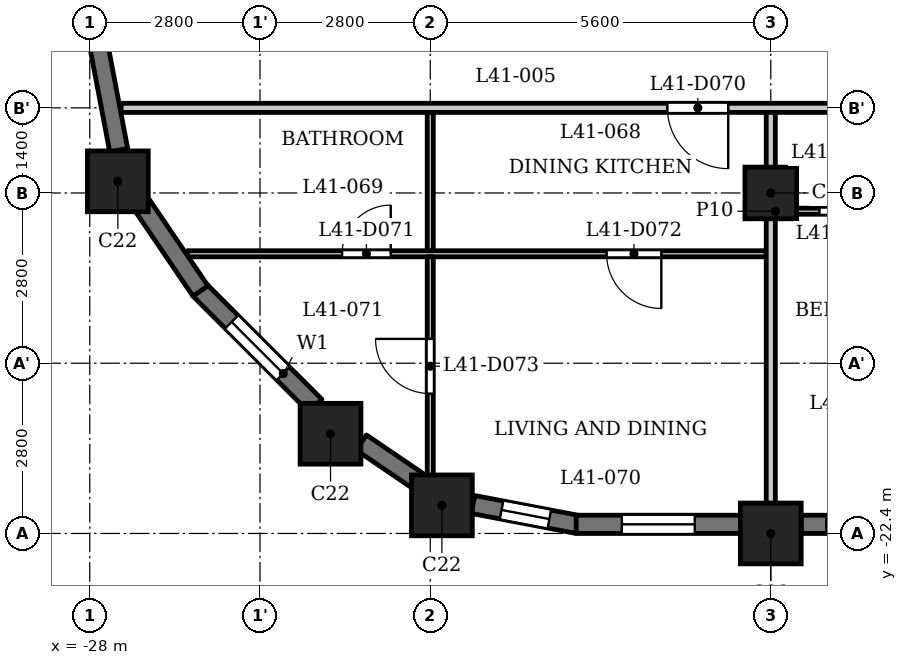
"""IFC4 building model, lengths in metres.
Left out: names, types, materials, properties, quantities, classifications, styles, units other than length and angle.
Written with IfcOpenShell. Run it as: python <this file> out.ifc"""

import sys

from ifc_helpers import new_model, si_unit, direction, frame, frame_2d, origin, origin_2d, place, context, subcontext, project, spatial, rectangle, extrude, element, fill, save


model = new_model("IFC4")
c1 = context("Model", 3, precision=1e-05, world=origin(), true_north=direction((0.0, 1.0)))
c2 = subcontext(c1, "Body", "Model", "MODEL_VIEW")
j1 = project(units=[si_unit("LENGTHUNIT", "METRE"), si_unit("PLANEANGLEUNIT", "RADIAN")], contexts=[c1])
p1 = place(None, origin())
s1 = spatial("IfcSite", under=j1, at=p1, CompositionType="ELEMENT")
p2 = place(p1, origin())
s2 = spatial("IfcBuilding", under=s1, at=p2, CompositionType="ELEMENT")
p3 = place(p2, frame((0.0, 0.0, 160.6)))
s3 = spatial("IfcBuildingStorey", under=s2, at=p3, CompositionType="ELEMENT", Elevation=160.6)
for number, where, z_axis, x_axis in (
    (1, (-22.209, -21.938, 0.0), (0.0, 0.0, 1.0), (1.0, 0.0, 0.0)),
    (2, (-16.8, -22.4, 0.0), (0.0, 0.0, 1.0), (1.0, 0.0, 0.0)),
    (3, (-27.538, -16.609, 0.0), (0.0, 0.0, 1.0), (1.0, 0.0, 0.0)),
    (4, (-24.04, -20.76, 0.0), (0.0, 0.0, 1.0), (1.0, 0.0, 0.0)),
):
    element("IfcColumn", number, at=place(p3, frame(where, z_axis=z_axis, x_axis=x_axis)), inside=s3, PredefinedType="COLUMN", context=c2, shape_type="SweptSolid", body=[
        extrude(rectangle(XDim=1.0, YDim=1.0, at=origin_2d()), origin(), (0.0, 0.0, 1.0), 3.5),
    ])
p4 = place(p3, frame((-16.8, -16.8, 0.0), z_axis=(0.0, 0.0, 1.0), x_axis=(1.0, 0.0, 0.0)))
e5 = element("IfcColumn", 5, at=p4, inside=s3, PredefinedType="COLUMN", context=c2, shape_type="SweptSolid", body=[
    extrude(rectangle(XDim=0.85, YDim=0.85, at=origin_2d()), origin(), (0.0, 0.0, 1.0), 3.5),
])
p5 = place(p3, frame((-26.197, -18.391, 0.0), z_axis=(0.0, 0.0, 1.0), x_axis=(0.707061571201, -0.707151988282, 0.0)))
e6 = element("IfcWall", 6, at=p5, inside=s3, PredefinedType="SOLIDWALL", context=c2, shape_type="SweptSolid", body=[
    extrude(rectangle(XDim=2.7, YDim=0.3, at=frame_2d((1.35, 0.0))), origin(), (0.0, 0.0, 1.0), 2.45),
])
p6 = place(p5, frame((0.75, 0.0, 0.6)))
e7 = element("IfcOpeningElement", 7, at=p6, cuts=e6, PredefinedType="OPENING", context=c2, shape_type="SweptSolid", body=[
    extrude(rectangle(XDim=1.2, YDim=1.55, at=frame_2d((0.6, 0.775))), frame((0.0, 0.16, 0.0), z_axis=(0.0, -1.0, 0.0), x_axis=(1.0, 0.0, 0.0)), (0.0, 0.0, 1.0), 0.32),
])
p7 = place(p3, frame((-23.534, -20.904, 0.0), z_axis=(0.0, 0.0, 1.0), x_axis=(0.827103906596, -0.56204904385, 0.0)))
e8 = element("IfcWall", 8, at=p7, inside=s3, PredefinedType="SOLIDWALL", context=c2, shape_type="SweptSolid", body=[
    extrude(rectangle(XDim=1.177, YDim=0.3, at=frame_2d((0.589, 0.0))), origin(), (0.0, 0.0, 1.0), 3.2),
])
p8 = place(p3, frame((-21.697, -21.924, 0.0), z_axis=(0.0, 0.0, 1.0), x_axis=(0.982284988433, -0.187393173565, 0.0)))
e9 = element("IfcWall", 9, at=p8, inside=s3, PredefinedType="SOLIDWALL", context=c2, shape_type="SweptSolid", body=[
    extrude(rectangle(XDim=1.756, YDim=0.3, at=frame_2d((0.878, 0.0))), origin(), (0.0, 0.0, 1.0), 2.45),
])
p9 = place(p8, frame((0.478, 0.0, 0.6)))
e10 = element("IfcOpeningElement", 10, at=p9, cuts=e9, PredefinedType="OPENING", context=c2, shape_type="SweptSolid", body=[
    extrude(rectangle(XDim=0.8, YDim=1.55, at=frame_2d((0.4, 0.775))), frame((0.0, 0.16, 0.0), z_axis=(0.0, -1.0, 0.0), x_axis=(1.0, 0.0, 0.0)), (0.0, 0.0, 1.0), 0.32),
])
p10 = place(p3, frame((-20.0, -22.25, 0.0), z_axis=(0.0, 0.0, 1.0), x_axis=(1.0, 0.0, 0.0)))
e11 = element("IfcWall", 11, at=p10, inside=s3, PredefinedType="SOLIDWALL", context=c2, shape_type="SweptSolid", body=[
    extrude(rectangle(XDim=2.7, YDim=0.3, at=frame_2d((1.35, 0.0))), origin(), (0.0, 0.0, 1.0), 2.45),
])
p11 = place(p10, frame((0.75, 0.0, 0.6)))
e12 = element("IfcOpeningElement", 12, at=p11, cuts=e11, PredefinedType="OPENING", context=c2, shape_type="SweptSolid", body=[
    extrude(rectangle(XDim=1.2, YDim=1.55, at=frame_2d((0.6, 0.775))), frame((0.0, 0.16, 0.0), z_axis=(0.0, -1.0, 0.0), x_axis=(1.0, 0.0, 0.0)), (0.0, 0.0, 1.0), 0.32),
])
p12 = place(p3, frame((-16.3, -22.25, 0.0), z_axis=(0.0, 0.0, 1.0), x_axis=(1.0, 0.0, 0.0)))
e13 = element("IfcWall", 13, at=p12, inside=s3, PredefinedType="SOLIDWALL", context=c2, shape_type="SweptSolid", body=[
    extrude(rectangle(XDim=4.6, YDim=0.3, at=frame_2d((2.3, 0.0))), origin(), (0.0, 0.0, 1.0), 2.45),
])
p13 = place(p12, frame((0.413, 0.0, 0.6)))
e14 = element("IfcOpeningElement", 14, at=p13, cuts=e13, PredefinedType="OPENING", context=c2, shape_type="SweptSolid", body=[
    extrude(rectangle(XDim=1.2, YDim=1.55, at=frame_2d((0.6, 0.775))), frame((0.0, 0.16, 0.0), z_axis=(0.0, -1.0, 0.0), x_axis=(1.0, 0.0, 0.0)), (0.0, 0.0, 1.0), 0.32),
])
p14 = place(p12, frame((2.488, 0.0, 0.9)))
e15 = element("IfcOpeningElement", 15, at=p14, cuts=e13, PredefinedType="OPENING", context=c2, shape_type="SweptSolid", body=[
    extrude(rectangle(XDim=1.8, YDim=1.25, at=frame_2d((0.9, 0.625))), frame((0.0, 0.16, 0.0), z_axis=(0.0, -1.0, 0.0), x_axis=(1.0, 0.0, 0.0)), (0.0, 0.0, 1.0), 0.32),
])
for number, where, z_axis, x_axis in (
    (16, (-27.853, -14.372, 0.0), (0.0, 0.0, 1.0), (0.187, -0.982, 0.0)),
    (17, (-27.166, -16.96, 0.0), (0.0, 0.0, 1.0), (0.562, -0.827, 0.0)),
):
    element("IfcWall", number, at=place(p3, frame(where, z_axis=z_axis, x_axis=x_axis)), inside=s3, PredefinedType="SOLIDWALL", context=c2, shape_type="SweptSolid", body=[
        extrude(rectangle(XDim=1.756, YDim=0.3, at=frame_2d((0.878, 0.0))), origin(), (0.0, 0.0, 1.0), 2.45),
    ])
p15 = place(p3, frame((-26.394, -17.8, 0.0), z_axis=(0.0, 0.0, 1.0), x_axis=(1.0, 0.0, 0.0)))
e18 = element("IfcWall", 18, at=p15, inside=s3, PredefinedType="PARTITIONING", context=c2, shape_type="SweptSolid", body=[
    extrude(rectangle(XDim=9.519, YDim=0.1, at=frame_2d((4.76, 0.0))), origin(), (0.0, 0.0, 1.0), 3.2),
])
p16 = place(p15, frame((2.544, 0.0, 0.0)))
e19 = element("IfcOpeningElement", 19, at=p16, cuts=e18, PredefinedType="OPENING", context=c2, shape_type="SweptSolid", body=[
    extrude(rectangle(XDim=0.8, YDim=2.1, at=frame_2d((0.4, 1.05))), frame((0.0, 0.06, 0.0), z_axis=(0.0, -1.0, 0.0), x_axis=(1.0, 0.0, 0.0)), (0.0, 0.0, 1.0), 0.12),
])
p17 = place(p15, frame((6.894, 0.0, 0.0)))
e20 = element("IfcOpeningElement", 20, at=p17, cuts=e18, PredefinedType="OPENING", context=c2, shape_type="SweptSolid", body=[
    extrude(rectangle(XDim=0.9, YDim=2.1, at=frame_2d((0.45, 1.05))), frame((0.0, 0.06, 0.0), z_axis=(0.0, -1.0, 0.0), x_axis=(1.0, 0.0, 0.0)), (0.0, 0.0, 1.0), 0.12),
])
p18 = place(p3, frame((-16.725, -17.1, 0.0), z_axis=(0.0, 0.0, 1.0), x_axis=(1.0, 0.0, 0.0)))
e21 = element("IfcWall", 21, at=p18, inside=s3, PredefinedType="PARTITIONING", context=c2, shape_type="SweptSolid", body=[
    extrude(rectangle(XDim=33.45, YDim=0.1, at=frame_2d((16.725, 0.0))), origin(), (0.0, 0.0, 1.0), 3.2),
])
p19 = place(p18, frame((0.725, 0.0, 0.0)))
e22 = element("IfcOpeningElement", 22, at=p19, cuts=e21, PredefinedType="OPENING", context=c2, shape_type="SweptSolid", body=[
    extrude(rectangle(XDim=0.8, YDim=2.1, at=frame_2d((0.4, 1.05))), frame((0.0, 0.06, 0.0), z_axis=(0.0, -1.0, 0.0), x_axis=(1.0, 0.0, 0.0)), (0.0, 0.0, 1.0), 0.12),
])
p20 = place(p18, frame((3.175, 0.0, 0.0)))
e23 = element("IfcOpeningElement", 23, at=p20, cuts=e21, PredefinedType="OPENING", context=c2, shape_type="SweptSolid", body=[
    extrude(rectangle(XDim=0.9, YDim=2.1, at=frame_2d((0.45, 1.05))), frame((0.0, 0.06, 0.0), z_axis=(0.0, -1.0, 0.0), x_axis=(1.0, 0.0, 0.0)), (0.0, 0.0, 1.0), 0.12),
])
p21 = place(p18, frame((6.075, 0.0, 0.0)))
e24 = element("IfcOpeningElement", 24, at=p21, cuts=e21, PredefinedType="OPENING", context=c2, shape_type="SweptSolid", body=[
    extrude(rectangle(XDim=0.8, YDim=2.1, at=frame_2d((0.4, 1.05))), frame((0.0, 0.06, 0.0), z_axis=(0.0, -1.0, 0.0), x_axis=(1.0, 0.0, 0.0)), (0.0, 0.0, 1.0), 0.12),
])
p22 = place(p18, frame((9.425, 0.0, 0.0)))
e25 = element("IfcOpeningElement", 25, at=p22, cuts=e21, PredefinedType="OPENING", context=c2, shape_type="SweptSolid", body=[
    extrude(rectangle(XDim=0.9, YDim=2.1, at=frame_2d((0.45, 1.05))), frame((0.0, 0.06, 0.0), z_axis=(0.0, -1.0, 0.0), x_axis=(1.0, 0.0, 0.0)), (0.0, 0.0, 1.0), 0.12),
])
p23 = place(p18, frame((12.675, 0.0, 0.0)))
e26 = element("IfcOpeningElement", 26, at=p23, cuts=e21, PredefinedType="OPENING", context=c2, shape_type="SweptSolid", body=[
    extrude(rectangle(XDim=0.8, YDim=2.1, at=frame_2d((0.4, 1.05))), frame((0.0, 0.06, 0.0), z_axis=(0.0, -1.0, 0.0), x_axis=(1.0, 0.0, 0.0)), (0.0, 0.0, 1.0), 0.12),
])
p24 = place(p18, frame((15.275, 0.0, 0.0)))
e27 = element("IfcOpeningElement", 27, at=p24, cuts=e21, PredefinedType="OPENING", context=c2, shape_type="SweptSolid", body=[
    extrude(rectangle(XDim=0.9, YDim=2.1, at=frame_2d((0.45, 1.05))), frame((0.0, 0.06, 0.0), z_axis=(0.0, -1.0, 0.0), x_axis=(1.0, 0.0, 0.0)), (0.0, 0.0, 1.0), 0.12),
])
p25 = place(p18, frame((20.625, 0.0, 0.0)))
e28 = element("IfcOpeningElement", 28, at=p25, cuts=e21, PredefinedType="OPENING", context=c2, shape_type="SweptSolid", body=[
    extrude(rectangle(XDim=0.8, YDim=2.1, at=frame_2d((0.4, 1.05))), frame((0.0, 0.06, 0.0), z_axis=(0.0, -1.0, 0.0), x_axis=(1.0, 0.0, 0.0)), (0.0, 0.0, 1.0), 0.12),
])
p26 = place(p18, frame((17.375, 0.0, 0.0)))
e29 = element("IfcOpeningElement", 29, at=p26, cuts=e21, PredefinedType="OPENING", context=c2, shape_type="SweptSolid", body=[
    extrude(rectangle(XDim=0.9, YDim=2.1, at=frame_2d((0.45, 1.05))), frame((0.0, 0.06, 0.0), z_axis=(0.0, -1.0, 0.0), x_axis=(1.0, 0.0, 0.0)), (0.0, 0.0, 1.0), 0.12),
])
p27 = place(p18, frame((31.075, 0.0, 0.0)))
e30 = element("IfcOpeningElement", 30, at=p27, cuts=e21, PredefinedType="OPENING", context=c2, shape_type="SweptSolid", body=[
    extrude(rectangle(XDim=0.8, YDim=2.1, at=frame_2d((0.4, 1.05))), frame((0.0, 0.06, 0.0), z_axis=(0.0, -1.0, 0.0), x_axis=(1.0, 0.0, 0.0)), (0.0, 0.0, 1.0), 0.12),
])
p28 = place(p18, frame((29.325, 0.0, 0.0)))
e31 = element("IfcOpeningElement", 31, at=p28, cuts=e21, PredefinedType="OPENING", context=c2, shape_type="SweptSolid", body=[
    extrude(rectangle(XDim=0.9, YDim=2.1, at=frame_2d((0.45, 1.05))), frame((0.0, 0.06, 0.0), z_axis=(0.0, -1.0, 0.0), x_axis=(1.0, 0.0, 0.0)), (0.0, 0.0, 1.0), 0.12),
])
p29 = place(p18, frame((23.725, 0.0, 0.0)))
e32 = element("IfcOpeningElement", 32, at=p29, cuts=e21, PredefinedType="OPENING", context=c2, shape_type="SweptSolid", body=[
    extrude(rectangle(XDim=0.9, YDim=2.1, at=frame_2d((0.45, 1.05))), frame((0.0, 0.06, 0.0), z_axis=(0.0, -1.0, 0.0), x_axis=(1.0, 0.0, 0.0)), (0.0, 0.0, 1.0), 0.12),
])
p30 = place(p18, frame((25.775, 0.0, 0.0)))
e33 = element("IfcOpeningElement", 33, at=p30, cuts=e21, PredefinedType="OPENING", context=c2, shape_type="SweptSolid", body=[
    extrude(rectangle(XDim=0.9, YDim=2.1, at=frame_2d((0.45, 1.05))), frame((0.0, 0.06, 0.0), z_axis=(0.0, -1.0, 0.0), x_axis=(1.0, 0.0, 0.0)), (0.0, 0.0, 1.0), 0.12),
])
p31 = place(p3, frame((-27.484, -15.4, 0.0), z_axis=(0.0, 0.0, 1.0), x_axis=(1.0, 0.0, 0.0)))
e34 = element("IfcWall", 34, at=p31, inside=s3, PredefinedType="PARTITIONING", context=c2, shape_type="SweptSolid", body=[
    extrude(rectangle(XDim=12.559, YDim=0.15, at=frame_2d((6.279, 0.0))), origin(), (0.0, 0.0, 1.0), 3.2),
])
p32 = place(p31, frame((8.984, 0.0, 0.0)))
e35 = element("IfcOpeningElement", 35, at=p32, cuts=e34, PredefinedType="OPENING", context=c2, shape_type="SweptSolid", body=[
    extrude(rectangle(XDim=1.0, YDim=2.1, at=frame_2d((0.5, 1.05))), frame((0.0, 0.085, 0.0), z_axis=(0.0, -1.0, 0.0), x_axis=(1.0, 0.0, 0.0)), (0.0, 0.0, 1.0), 0.17),
])
p33 = place(p3, frame((-22.4, -21.72, 0.0), z_axis=(0.0, 0.0, 1.0), x_axis=(0.0, 1.0, 0.0)))
e36 = element("IfcWall", 36, at=p33, inside=s3, PredefinedType="PARTITIONING", context=c2, shape_type="SweptSolid", body=[
    extrude(rectangle(XDim=3.87, YDim=0.1, at=frame_2d((1.935, 0.0))), origin(), (0.0, 0.0, 1.0), 3.2),
])
p34 = place(p33, frame((1.62, 0.0, 0.0)))
e37 = element("IfcOpeningElement", 37, at=p34, cuts=e36, PredefinedType="OPENING", context=c2, shape_type="SweptSolid", body=[
    extrude(rectangle(XDim=0.9, YDim=2.1, at=frame_2d((0.45, 1.05))), frame((0.0, 0.06, 0.0), z_axis=(0.0, -1.0, 0.0), x_axis=(1.0, 0.0, 0.0)), (0.0, 0.0, 1.0), 0.12),
])
p35 = place(p3, frame((-22.4, -17.75, 0.0), z_axis=(0.0, 0.0, 1.0), x_axis=(0.0, 1.0, 0.0)))
e38 = element("IfcWall", 38, at=p35, inside=s3, PredefinedType="PARTITIONING", context=c2, shape_type="SweptSolid", body=[
    extrude(rectangle(XDim=2.275, YDim=0.1, at=frame_2d((1.137, 0.0))), origin(), (0.0, 0.0, 1.0), 3.2),
])
p36 = place(p3, frame((-16.8, -22.88, 0.0), z_axis=(0.0, 0.0, 1.0), x_axis=(0.0, 1.0, 0.0)))
e39 = element("IfcWall", 39, at=p36, inside=s3, PredefinedType="PARTITIONING", context=c2, shape_type="SweptSolid", body=[
    extrude(rectangle(XDim=7.405, YDim=0.15, at=frame_2d((3.702, 0.0))), origin(), (0.0, 0.0, 1.0), 3.2),
])
p37 = place(p19, origin())
e40 = element("IfcDoor", 40, at=p37, inside=s3, OperationType="SINGLE_SWING_LEFT", PredefinedType="DOOR", context=c2, shape_type="SweptSolid", body=[
    extrude(rectangle(XDim=0.8, YDim=2.1, at=frame_2d((0.4, 1.05))), frame((0.0, 0.025, 0.0), z_axis=(0.0, -1.0, 0.0), x_axis=(1.0, 0.0, 0.0)), (0.0, 0.0, 1.0), 0.05),
])
fill(e22, e40)
p38 = place(p32, origin())
e41 = element("IfcDoor", 41, at=p38, inside=s3, OperationType="SINGLE_SWING_RIGHT", PredefinedType="DOOR", context=c2, shape_type="SweptSolid", body=[
    extrude(rectangle(XDim=1.0, YDim=2.1, at=frame_2d((0.5, 1.05))), frame((0.0, 0.025, 0.0), z_axis=(0.0, -1.0, 0.0), x_axis=(1.0, 0.0, 0.0)), (0.0, 0.0, 1.0), 0.05),
])
fill(e35, e41)
p39 = place(p16, origin())
e42 = element("IfcDoor", 42, at=p39, inside=s3, OperationType="SINGLE_SWING_LEFT", PredefinedType="DOOR", context=c2, shape_type="SweptSolid", body=[
    extrude(rectangle(XDim=0.8, YDim=2.1, at=frame_2d((0.4, 1.05))), frame((0.0, 0.025, 0.0), z_axis=(0.0, -1.0, 0.0), x_axis=(1.0, 0.0, 0.0)), (0.0, 0.0, 1.0), 0.05),
])
fill(e19, e42)
p40 = place(p17, origin())
e43 = element("IfcDoor", 43, at=p40, inside=s3, OperationType="SINGLE_SWING_RIGHT", PredefinedType="DOOR", context=c2, shape_type="SweptSolid", body=[
    extrude(rectangle(XDim=0.9, YDim=2.1, at=frame_2d((0.45, 1.05))), frame((0.0, 0.025, 0.0), z_axis=(0.0, -1.0, 0.0), x_axis=(1.0, 0.0, 0.0)), (0.0, 0.0, 1.0), 0.05),
])
fill(e20, e43)
p41 = place(p34, origin())
e44 = element("IfcDoor", 44, at=p41, inside=s3, OperationType="SINGLE_SWING_LEFT", PredefinedType="DOOR", context=c2, shape_type="SweptSolid", body=[
    extrude(rectangle(XDim=0.9, YDim=2.1, at=frame_2d((0.45, 1.05))), frame((0.0, 0.025, 0.0), z_axis=(0.0, -1.0, 0.0), x_axis=(1.0, 0.0, 0.0)), (0.0, 0.0, 1.0), 0.05),
])
fill(e37, e44)
p42 = place(p6, origin())
e45 = element("IfcWindow", 45, at=p42, inside=s3, PartitioningType="SINGLE_PANEL", PredefinedType="WINDOW", context=c2, shape_type="SweptSolid", body=[
    extrude(rectangle(XDim=1.2, YDim=1.55, at=frame_2d((0.6, 0.775))), frame((0.0, 0.03, 0.0), z_axis=(0.0, -1.0, 0.0), x_axis=(1.0, 0.0, 0.0)), (0.0, 0.0, 1.0), 0.06),
])
fill(e7, e45)
p43 = place(p9, origin())
e46 = element("IfcWindow", 46, at=p43, inside=s3, PartitioningType="SINGLE_PANEL", PredefinedType="WINDOW", context=c2, shape_type="SweptSolid", body=[
    extrude(rectangle(XDim=0.8, YDim=1.55, at=frame_2d((0.4, 0.775))), frame((0.0, 0.03, 0.0), z_axis=(0.0, -1.0, 0.0), x_axis=(1.0, 0.0, 0.0)), (0.0, 0.0, 1.0), 0.06),
])
fill(e10, e46)
p44 = place(p11, origin())
e47 = element("IfcWindow", 47, at=p44, inside=s3, PartitioningType="SINGLE_PANEL", PredefinedType="WINDOW", context=c2, shape_type="SweptSolid", body=[
    extrude(rectangle(XDim=1.2, YDim=1.55, at=frame_2d((0.6, 0.775))), frame((0.0, 0.03, 0.0), z_axis=(0.0, -1.0, 0.0), x_axis=(1.0, 0.0, 0.0)), (0.0, 0.0, 1.0), 0.06),
])
fill(e12, e47)
p45 = place(p13, origin())
e48 = element("IfcWindow", 48, at=p45, inside=s3, PartitioningType="SINGLE_PANEL", PredefinedType="WINDOW", context=c2, shape_type="SweptSolid", body=[
    extrude(rectangle(XDim=1.2, YDim=1.55, at=frame_2d((0.6, 0.775))), frame((0.0, 0.03, 0.0), z_axis=(0.0, -1.0, 0.0), x_axis=(1.0, 0.0, 0.0)), (0.0, 0.0, 1.0), 0.06),
])
fill(e14, e48)
save(model, sys.argv[1])
